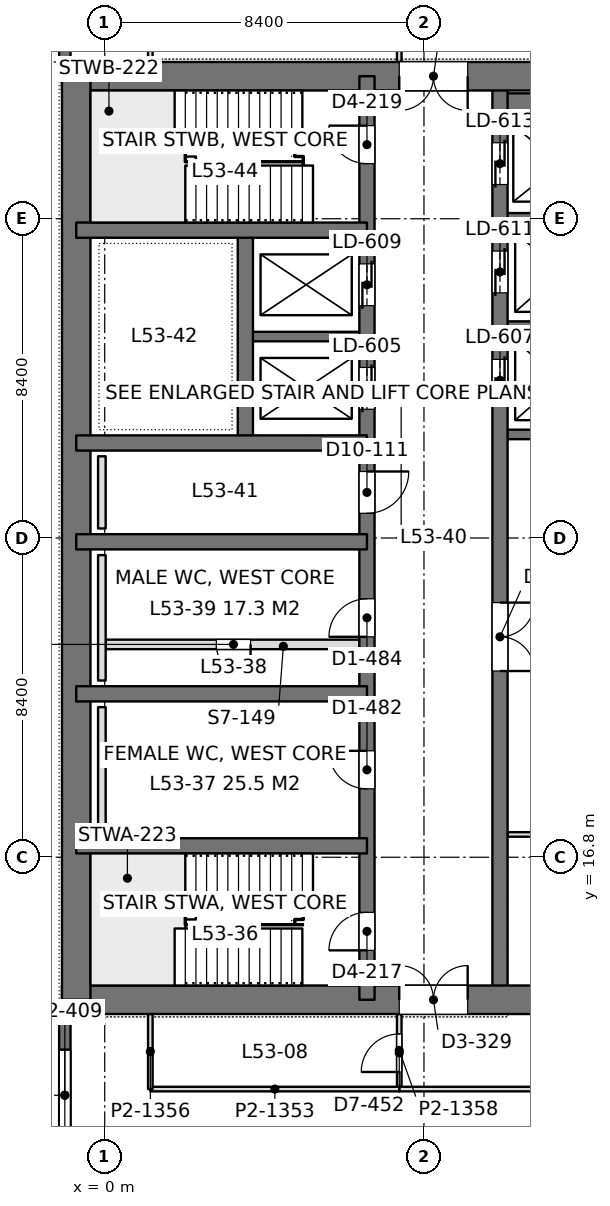
"""IFC4 building model, lengths in metres.
Left out: names, types, materials, properties, quantities, classifications, styles, units other than length and angle.
Written with IfcOpenShell. Run it as: python <this file> out.ifc"""

import sys

from ifc_helpers import new_model, si_unit, direction, frame, frame_2d, origin, place, context, subcontext, project, spatial, rectangle, extrude, element, fill, save


model = new_model("IFC4")
c1 = context("Model", 3, precision=1e-05, world=origin(), true_north=direction((0.0, 1.0)))
c2 = subcontext(c1, "Body", "Model", "MODEL_VIEW")
j1 = project(units=[si_unit("LENGTHUNIT", "METRE"), si_unit("PLANEANGLEUNIT", "RADIAN")], contexts=[c1])
p1 = place(None, origin())
s1 = spatial("IfcSite", under=j1, at=p1, CompositionType="ELEMENT")
p2 = place(p1, origin())
s2 = spatial("IfcBuilding", under=s1, at=p2, CompositionType="ELEMENT")
p3 = place(p2, frame((0.0, 0.0, 232.2)))
s3 = spatial("IfcBuildingStorey", under=s2, at=p3, CompositionType="ELEMENT", Elevation=232.2)
p4 = place(p3, frame((-1.125, 13.05, 0.0), z_axis=(0.0, 0.0, 1.0), x_axis=(1.0, 0.0, 0.0)))
e1 = element("IfcWall", 1, at=p4, inside=s3, PredefinedType="SHEAR", context=c2, shape_type="SweptSolid", body=[
    extrude(rectangle(XDim=17.85, YDim=0.75, at=frame_2d((8.925, 0.0))), origin(), (0.0, 0.0, 1.0), 4.2),
])
p5 = place(p4, frame((8.875, 0.0, 0.0)))
e2 = element("IfcOpeningElement", 2, at=p5, cuts=e1, PredefinedType="OPENING", context=c2, shape_type="SweptSolid", body=[
    extrude(rectangle(XDim=1.8, YDim=2.4, at=frame_2d((0.9, 1.2))), frame((0.0, 0.385, 0.0), z_axis=(0.0, -1.0, 0.0), x_axis=(1.0, 0.0, 0.0)), (0.0, 0.0, 1.0), 0.77),
])
p6 = place(p3, frame((-1.125, 37.35, 0.0), z_axis=(0.0, 0.0, 1.0), x_axis=(1.0, 0.0, 0.0)))
e3 = element("IfcWall", 3, at=p6, inside=s3, PredefinedType="SHEAR", context=c2, shape_type="SweptSolid", body=[
    extrude(rectangle(XDim=17.85, YDim=0.75, at=frame_2d((8.925, 0.0))), origin(), (0.0, 0.0, 1.0), 4.2),
])
p7 = place(p6, frame((8.875, 0.0, 0.0)))
e4 = element("IfcOpeningElement", 4, at=p7, cuts=e3, PredefinedType="OPENING", context=c2, shape_type="SweptSolid", body=[
    extrude(rectangle(XDim=1.8, YDim=2.4, at=frame_2d((0.9, 1.2))), frame((0.0, 0.385, 0.0), z_axis=(0.0, -1.0, 0.0), x_axis=(1.0, 0.0, 0.0)), (0.0, 0.0, 1.0), 0.77),
])
p8 = place(p3, frame((-0.75, 13.05, 0.0), z_axis=(0.0, 0.0, 1.0), x_axis=(0.0, 1.0, 0.0)))
e5 = element("IfcWall", 5, at=p8, inside=s3, PredefinedType="SHEAR", context=c2, shape_type="SweptSolid", body=[
    extrude(rectangle(XDim=24.3, YDim=0.75, at=frame_2d((12.15, 0.0))), origin(), (0.0, 0.0, 1.0), 4.2),
])
p9 = place(p3, frame((6.9, 13.05, 0.0), z_axis=(0.0, 0.0, 1.0), x_axis=(0.0, 1.0, 0.0)))
e6 = element("IfcWall", 6, at=p9, inside=s3, PredefinedType="SHEAR", context=c2, shape_type="SweptSolid", body=[
    extrude(rectangle(XDim=24.3, YDim=0.4, at=frame_2d((12.15, 0.0))), origin(), (0.0, 0.0, 1.0), 4.2),
])
p10 = place(p9, frame((1.3, 0.0, 0.0)))
e7 = element("IfcOpeningElement", 7, at=p10, cuts=e6, PredefinedType="OPENING", context=c2, shape_type="SweptSolid", body=[
    extrude(rectangle(XDim=1.0, YDim=2.2, at=frame_2d((0.5, 1.1))), frame((0.0, 0.21, 0.0), z_axis=(0.0, -1.0, 0.0), x_axis=(1.0, 0.0, 0.0)), (0.0, 0.0, 1.0), 0.42),
])
p11 = place(p9, frame((22.0, 0.0, 0.0)))
e8 = element("IfcOpeningElement", 8, at=p11, cuts=e6, PredefinedType="OPENING", context=c2, shape_type="SweptSolid", body=[
    extrude(rectangle(XDim=1.0, YDim=2.2, at=frame_2d((0.5, 1.1))), frame((0.0, 0.21, 0.0), z_axis=(0.0, -1.0, 0.0), x_axis=(1.0, 0.0, 0.0)), (0.0, 0.0, 1.0), 0.42),
])
p12 = place(p9, frame((5.55, 0.0, 0.0)))
e9 = element("IfcOpeningElement", 9, at=p12, cuts=e6, PredefinedType="OPENING", context=c2, shape_type="SweptSolid", body=[
    extrude(rectangle(XDim=1.0, YDim=2.2, at=frame_2d((0.5, 1.1))), frame((0.0, 0.21, 0.0), z_axis=(0.0, -1.0, 0.0), x_axis=(1.0, 0.0, 0.0)), (0.0, 0.0, 1.0), 0.42),
])
p13 = place(p9, frame((9.55, 0.0, 0.0)))
e10 = element("IfcOpeningElement", 10, at=p13, cuts=e6, PredefinedType="OPENING", context=c2, shape_type="SweptSolid", body=[
    extrude(rectangle(XDim=1.0, YDim=2.2, at=frame_2d((0.5, 1.1))), frame((0.0, 0.21, 0.0), z_axis=(0.0, -1.0, 0.0), x_axis=(1.0, 0.0, 0.0)), (0.0, 0.0, 1.0), 0.42),
])
p14 = place(p9, frame((12.8, 0.0, 0.0)))
e11 = element("IfcOpeningElement", 11, at=p14, cuts=e6, PredefinedType="OPENING", context=c2, shape_type="SweptSolid", body=[
    extrude(rectangle(XDim=1.1, YDim=2.2, at=frame_2d((0.55, 1.1))), frame((0.0, 0.21, 0.0), z_axis=(0.0, -1.0, 0.0), x_axis=(1.0, 0.0, 0.0)), (0.0, 0.0, 1.0), 0.42),
])
p15 = place(p9, frame((15.538, 0.0, 0.0)))
e12 = element("IfcOpeningElement", 12, at=p15, cuts=e6, PredefinedType="OPENING", context=c2, shape_type="SweptSolid", body=[
    extrude(rectangle(XDim=1.1, YDim=2.2, at=frame_2d((0.55, 1.1))), frame((0.0, 0.21, 0.0), z_axis=(0.0, -1.0, 0.0), x_axis=(1.0, 0.0, 0.0)), (0.0, 0.0, 1.0), 0.42),
])
p16 = place(p9, frame((18.262, 0.0, 0.0)))
e13 = element("IfcOpeningElement", 13, at=p16, cuts=e6, PredefinedType="OPENING", context=c2, shape_type="SweptSolid", body=[
    extrude(rectangle(XDim=1.1, YDim=2.2, at=frame_2d((0.55, 1.1))), frame((0.0, 0.21, 0.0), z_axis=(0.0, -1.0, 0.0), x_axis=(1.0, 0.0, 0.0)), (0.0, 0.0, 1.0), 0.42),
])
p17 = place(p3, frame((10.4, 13.05, 0.0), z_axis=(0.0, 0.0, 1.0), x_axis=(0.0, 1.0, 0.0)))
e14 = element("IfcWall", 14, at=p17, inside=s3, PredefinedType="SHEAR", context=c2, shape_type="SweptSolid", body=[
    extrude(rectangle(XDim=24.3, YDim=0.4, at=frame_2d((12.15, 0.0))), origin(), (0.0, 0.0, 1.0), 4.2),
])
p18 = place(p17, frame((15.75, 0.0, 0.0)))
e15 = element("IfcOpeningElement", 15, at=p18, cuts=e14, PredefinedType="OPENING", context=c2, shape_type="SweptSolid", body=[
    extrude(rectangle(XDim=1.1, YDim=2.2, at=frame_2d((0.55, 1.1))), frame((0.0, 0.21, 0.0), z_axis=(0.0, -1.0, 0.0), x_axis=(1.0, 0.0, 0.0)), (0.0, 0.0, 1.0), 0.42),
])
p19 = place(p17, frame((18.6, 0.0, 0.0)))
e16 = element("IfcOpeningElement", 16, at=p19, cuts=e14, PredefinedType="OPENING", context=c2, shape_type="SweptSolid", body=[
    extrude(rectangle(XDim=1.1, YDim=2.2, at=frame_2d((0.55, 1.1))), frame((0.0, 0.21, 0.0), z_axis=(0.0, -1.0, 0.0), x_axis=(1.0, 0.0, 0.0)), (0.0, 0.0, 1.0), 0.42),
])
p20 = place(p17, frame((21.45, 0.0, 0.0)))
e17 = element("IfcOpeningElement", 17, at=p20, cuts=e14, PredefinedType="OPENING", context=c2, shape_type="SweptSolid", body=[
    extrude(rectangle(XDim=1.1, YDim=2.2, at=frame_2d((0.55, 1.1))), frame((0.0, 0.21, 0.0), z_axis=(0.0, -1.0, 0.0), x_axis=(1.0, 0.0, 0.0)), (0.0, 0.0, 1.0), 0.42),
])
p21 = place(p17, frame((8.65, 0.0, 0.0)))
e18 = element("IfcOpeningElement", 18, at=p21, cuts=e14, PredefinedType="OPENING", context=c2, shape_type="SweptSolid", body=[
    extrude(rectangle(XDim=1.8, YDim=2.4, at=frame_2d((0.9, 1.2))), frame((0.0, 0.21, 0.0), z_axis=(0.0, -1.0, 0.0), x_axis=(1.0, 0.0, 0.0)), (0.0, 0.0, 1.0), 0.42),
])
for number, where, z_axis, x_axis in (
    (19, (-0.75, 17.1, 0.0), (0.0, 0.0, 1.0), (1.0, 0.0, 0.0)),
    (20, (-0.75, 21.1, 0.0), (0.0, 0.0, 1.0), (1.0, 0.0, 0.0)),
    (21, (-0.75, 25.1, 0.0), (0.0, 0.0, 1.0), (1.0, 0.0, 0.0)),
    (22, (-0.75, 27.7, 0.0), (0.0, 0.0, 1.0), (1.0, 0.0, 0.0)),
    (23, (-0.75, 33.3, 0.0), (0.0, 0.0, 1.0), (1.0, 0.0, 0.0)),
):
    element("IfcWall", number, at=place(p3, frame(where, z_axis=z_axis, x_axis=x_axis)), inside=s3, PredefinedType="SHEAR", context=c2, shape_type="SweptSolid", body=[
        extrude(rectangle(XDim=7.65, YDim=0.4, at=frame_2d((3.825, 0.0))), origin(), (0.0, 0.0, 1.0), 4.2),
    ])
p22 = place(p3, frame((3.7, 27.7, 0.0), z_axis=(0.0, 0.0, 1.0), x_axis=(0.0, 1.0, 0.0)))
e24 = element("IfcWall", 24, at=p22, inside=s3, PredefinedType="SHEAR", context=c2, shape_type="SweptSolid", body=[
    extrude(rectangle(XDim=5.6, YDim=0.4, at=frame_2d((2.8, 0.0))), origin(), (0.0, 0.0, 1.0), 4.2),
])
p23 = place(p3, frame((3.7, 30.5, 0.0), z_axis=(0.0, 0.0, 1.0), x_axis=(1.0, 0.0, 0.0)))
e25 = element("IfcWall", 25, at=p23, inside=s3, PredefinedType="SHEAR", context=c2, shape_type="SweptSolid", body=[
    extrude(rectangle(XDim=3.2, YDim=0.25, at=frame_2d((1.6, 0.0))), origin(), (0.0, 0.0, 1.0), 4.2),
])
p24 = place(p3, frame((10.4, 27.925, 0.0), z_axis=(0.0, 0.0, 1.0), x_axis=(1.0, 0.0, 0.0)))
e26 = element("IfcWall", 26, at=p24, inside=s3, PredefinedType="SHEAR", context=c2, shape_type="SweptSolid", body=[
    extrude(rectangle(XDim=5.95, YDim=0.25, at=frame_2d((2.975, 0.0))), origin(), (0.0, 0.0, 1.0), 4.2),
])
for number, where, z_axis, x_axis in (
    (27, (10.4, 30.775, 0.0), (0.0, 0.0, 1.0), (1.0, 0.0, 0.0)),
    (28, (10.4, 33.625, 0.0), (0.0, 0.0, 1.0), (1.0, 0.0, 0.0)),
):
    element("IfcWall", number, at=place(p3, frame(where, z_axis=z_axis, x_axis=x_axis)), inside=s3, PredefinedType="SHEAR", context=c2, shape_type="SweptSolid", body=[
        extrude(rectangle(XDim=3.2, YDim=0.25, at=frame_2d((1.6, 0.0))), origin(), (0.0, 0.0, 1.0), 4.2),
    ])
p25 = place(p3, frame((10.4, 36.625, 0.0), z_axis=(0.0, 0.0, 1.0), x_axis=(1.0, 0.0, 0.0)))
e29 = element("IfcWall", 29, at=p25, inside=s3, PredefinedType="SHEAR", context=c2, shape_type="SweptSolid", body=[
    extrude(rectangle(XDim=3.2, YDim=0.55, at=frame_2d((1.6, 0.0))), origin(), (0.0, 0.0, 1.0), 4.2),
])
p26 = place(p3, frame((-1.05, 8.4, 0.0), z_axis=(0.0, 0.0, 1.0), x_axis=(0.0, 1.0, 0.0)))
e30 = element("IfcWall", 30, at=p26, inside=s3, PredefinedType="SOLIDWALL", context=c2, shape_type="SweptSolid", body=[
    extrude(rectangle(XDim=4.275, YDim=0.3, at=frame_2d((2.138, 0.0))), origin(), (0.0, 0.0, 1.0), 4.05),
])
p27 = place(p26, frame((0.938, 0.0, 0.9)))
e31 = element("IfcOpeningElement", 31, at=p27, cuts=e30, PredefinedType="OPENING", context=c2, shape_type="SweptSolid", body=[
    extrude(rectangle(XDim=2.4, YDim=1.9, at=frame_2d((1.2, 0.95))), frame((0.0, 0.16, 0.0), z_axis=(0.0, -1.0, 0.0), x_axis=(1.0, 0.0, 0.0)), (0.0, 0.0, 1.0), 0.32),
])
p28 = place(p3, frame((-1.05, 37.725, 0.0), z_axis=(0.0, 0.0, 1.0), x_axis=(0.0, 1.0, 0.0)))
e32 = element("IfcWall", 32, at=p28, inside=s3, PredefinedType="SOLIDWALL", context=c2, shape_type="SweptSolid", body=[
    extrude(rectangle(XDim=4.275, YDim=0.3, at=frame_2d((2.137, 0.0))), origin(), (0.0, 0.0, 1.0), 4.05),
])
p29 = place(p28, frame((0.938, 0.0, 0.9)))
e33 = element("IfcOpeningElement", 33, at=p29, cuts=e32, PredefinedType="OPENING", context=c2, shape_type="SweptSolid", body=[
    extrude(rectangle(XDim=2.4, YDim=1.9, at=frame_2d((1.2, 0.95))), frame((0.0, 0.16, 0.0), z_axis=(0.0, -1.0, 0.0), x_axis=(1.0, 0.0, 0.0)), (0.0, 0.0, 1.0), 0.32),
])
p30 = place(p3, frame((10.598, 17.4, 0.0), z_axis=(0.0, 0.0, 1.0), x_axis=(1.0, 0.0, 0.0)))
e34 = element("IfcWall", 34, at=p30, inside=s3, PredefinedType="PARTITIONING", context=c2, shape_type="SweptSolid", body=[
    extrude(rectangle(XDim=5.904, YDim=0.12, at=frame_2d((2.952, 0.0))), origin(), (0.0, 0.0, 1.0), 3.55),
])
p31 = place(p3, frame((7.748, 10.7, 0.0), z_axis=(0.0, 0.0, 1.0), x_axis=(1.0, 0.0, 0.0)))
e35 = element("IfcWall", 35, at=p31, inside=s3, PredefinedType="PARTITIONING", context=c2, shape_type="SweptSolid", body=[
    extrude(rectangle(XDim=34.904, YDim=0.12, at=frame_2d((17.452, 0.0))), origin(), (0.0, 0.0, 1.0), 3.55),
])
p32 = place(p31, frame((10.735, 0.0, 0.0)))
e36 = element("IfcOpeningElement", 36, at=p32, cuts=e35, PredefinedType="OPENING", context=c2, shape_type="SweptSolid", body=[
    extrude(rectangle(XDim=1.8, YDim=2.2, at=frame_2d((0.9, 1.1))), frame((0.0, 0.07, 0.0), z_axis=(0.0, -1.0, 0.0), x_axis=(1.0, 0.0, 0.0)), (0.0, 0.0, 1.0), 0.14),
])
p33 = place(p31, frame((22.369, 0.0, 0.0)))
e37 = element("IfcOpeningElement", 37, at=p33, cuts=e35, PredefinedType="OPENING", context=c2, shape_type="SweptSolid", body=[
    extrude(rectangle(XDim=1.8, YDim=2.2, at=frame_2d((0.9, 1.1))), frame((0.0, 0.07, 0.0), z_axis=(0.0, -1.0, 0.0), x_axis=(1.0, 0.0, 0.0)), (0.0, 0.0, 1.0), 0.14),
])
p34 = place(p3, frame((7.75, 10.758, 0.0), z_axis=(0.0, 0.0, 1.0), x_axis=(0.0, 1.0, 0.0)))
e38 = element("IfcWall", 38, at=p34, inside=s3, PredefinedType="PARTITIONING", context=c2, shape_type="SweptSolid", body=[
    extrude(rectangle(XDim=1.918, YDim=0.12, at=frame_2d((0.959, 0.0))), origin(), (0.0, 0.0, 1.0), 4.05),
])
p35 = place(p34, frame((0.392, 0.0, 0.0)))
e39 = element("IfcOpeningElement", 39, at=p35, cuts=e38, PredefinedType="OPENING", context=c2, shape_type="SweptSolid", body=[
    extrude(rectangle(XDim=1.0, YDim=2.4, at=frame_2d((0.5, 1.2))), frame((0.0, 0.07, 0.0), z_axis=(0.0, -1.0, 0.0), x_axis=(1.0, 0.0, 0.0)), (0.0, 0.0, 1.0), 0.14),
])
p36 = place(p3, frame((1.2, 10.7, 0.0), z_axis=(0.0, 0.0, 1.0), x_axis=(1.0, 0.0, 0.0)))
e40 = element("IfcWall", 40, at=p36, inside=s3, PredefinedType="PARTITIONING", context=c2, shape_type="SweptSolid", body=[
    extrude(rectangle(XDim=6.552, YDim=0.12, at=frame_2d((3.276, 0.0))), origin(), (0.0, 0.0, 1.0), 4.05),
])
p37 = place(p3, frame((1.2, 10.7, 0.0), z_axis=(0.0, 0.0, 1.0), x_axis=(0.0, 1.0, 0.0)))
e41 = element("IfcWall", 41, at=p37, inside=s3, PredefinedType="PARTITIONING", context=c2, shape_type="SweptSolid", body=[
    extrude(rectangle(XDim=1.976, YDim=0.12, at=frame_2d((0.988, 0.0))), origin(), (0.0, 0.0, 1.0), 4.05),
])
p38 = place(p3, frame((7.75, 37.724, 0.0), z_axis=(0.0, 0.0, 1.0), x_axis=(0.0, 1.0, 0.0)))
e42 = element("IfcWall", 42, at=p38, inside=s3, PredefinedType="PARTITIONING", context=c2, shape_type="SweptSolid", body=[
    extrude(rectangle(XDim=1.918, YDim=0.12, at=frame_2d((0.959, 0.0))), origin(), (0.0, 0.0, 1.0), 4.05),
])
p39 = place(p38, frame((0.526, 0.0, 0.0)))
e43 = element("IfcOpeningElement", 43, at=p39, cuts=e42, PredefinedType="OPENING", context=c2, shape_type="SweptSolid", body=[
    extrude(rectangle(XDim=1.0, YDim=2.4, at=frame_2d((0.5, 1.2))), frame((0.0, 0.07, 0.0), z_axis=(0.0, -1.0, 0.0), x_axis=(1.0, 0.0, 0.0)), (0.0, 0.0, 1.0), 0.14),
])
p40 = place(p3, frame((1.2, 37.724, 0.0), z_axis=(0.0, 0.0, 1.0), x_axis=(0.0, 1.0, 0.0)))
e44 = element("IfcWall", 44, at=p40, inside=s3, PredefinedType="PARTITIONING", context=c2, shape_type="SweptSolid", body=[
    extrude(rectangle(XDim=1.976, YDim=0.12, at=frame_2d((0.988, 0.0))), origin(), (0.0, 0.0, 1.0), 4.05),
])
p41 = place(p3, frame((0.025, 22.4, 0.0), z_axis=(0.0, 0.0, 1.0), x_axis=(1.0, 0.0, 0.0)))
e45 = element("IfcWall", 45, at=p41, inside=s3, PredefinedType="PARTITIONING", context=c2, shape_type="SweptSolid", body=[
    extrude(rectangle(XDim=6.675, YDim=0.25, at=frame_2d((3.337, 0.0))), origin(), (0.0, 0.0, 1.0), 4.0),
])
p42 = place(p41, frame((2.913, 0.0, 0.0)))
e46 = element("IfcOpeningElement", 46, at=p42, cuts=e45, PredefinedType="OPENING", context=c2, shape_type="SweptSolid", body=[
    extrude(rectangle(XDim=0.9, YDim=2.2, at=frame_2d((0.45, 1.1))), frame((0.0, 0.135, 0.0), z_axis=(0.0, -1.0, 0.0), x_axis=(1.0, 0.0, 0.0)), (0.0, 0.0, 1.0), 0.27),
])
for number, where, z_axis, x_axis in (
    (47, (-0.075, 17.45, 0.0), (0.0, 0.0, 1.0), (0.0, 1.0, 0.0)),
    (48, (-0.075, 21.45, 0.0), (0.0, 0.0, 1.0), (0.0, 1.0, 0.0)),
):
    element("IfcWall", number, at=place(p3, frame(where, z_axis=z_axis, x_axis=x_axis)), inside=s3, PredefinedType="PLUMBINGWALL", context=c2, shape_type="SweptSolid", body=[
        extrude(rectangle(XDim=3.3, YDim=0.2, at=frame_2d((1.65, 0.0))), origin(), (0.0, 0.0, 1.0), 1.2),
    ])
p43 = place(p3, frame((-0.075, 25.45, 0.0), z_axis=(0.0, 0.0, 1.0), x_axis=(0.0, 1.0, 0.0)))
e49 = element("IfcWall", 49, at=p43, inside=s3, PredefinedType="PLUMBINGWALL", context=c2, shape_type="SweptSolid", body=[
    extrude(rectangle(XDim=1.9, YDim=0.2, at=frame_2d((0.95, 0.0))), origin(), (0.0, 0.0, 1.0), 1.2),
])
p44 = place(p27, origin())
e50 = element("IfcWindow", 50, at=p44, inside=s3, PartitioningType="SINGLE_PANEL", PredefinedType="WINDOW", context=c2, shape_type="SweptSolid", body=[
    extrude(rectangle(XDim=2.4, YDim=1.9, at=frame_2d((1.2, 0.95))), frame((0.0, 0.03, 0.0), z_axis=(0.0, -1.0, 0.0), x_axis=(1.0, 0.0, 0.0)), (0.0, 0.0, 1.0), 0.06),
])
fill(e31, e50)
p45 = place(p5, origin())
e51 = element("IfcDoor", 51, at=p45, inside=s3, OperationType="DOUBLE_DOOR_SINGLE_SWING", PredefinedType="DOOR", context=c2, shape_type="SweptSolid", body=[
    extrude(rectangle(XDim=1.8, YDim=2.4, at=frame_2d((0.9, 1.2))), frame((0.0, 0.025, 0.0), z_axis=(0.0, -1.0, 0.0), x_axis=(1.0, 0.0, 0.0)), (0.0, 0.0, 1.0), 0.05),
])
fill(e2, e51)
p46 = place(p7, frame((1.8, 0.0, 0.0), z_axis=(0.0, 0.0, 1.0), x_axis=(-1.0, 0.0, 0.0)))
e52 = element("IfcDoor", 52, at=p46, inside=s3, OperationType="DOUBLE_DOOR_SINGLE_SWING", PredefinedType="DOOR", context=c2, shape_type="SweptSolid", body=[
    extrude(rectangle(XDim=1.8, YDim=2.4, at=frame_2d((0.9, 1.2))), frame((0.0, 0.025, 0.0), z_axis=(0.0, -1.0, 0.0), x_axis=(1.0, 0.0, 0.0)), (0.0, 0.0, 1.0), 0.05),
])
fill(e4, e52)
p47 = place(p10, origin())
e53 = element("IfcDoor", 53, at=p47, inside=s3, OperationType="SINGLE_SWING_LEFT", PredefinedType="DOOR", context=c2, shape_type="SweptSolid", body=[
    extrude(rectangle(XDim=1.0, YDim=2.2, at=frame_2d((0.5, 1.1))), frame((0.0, 0.025, 0.0), z_axis=(0.0, -1.0, 0.0), x_axis=(1.0, 0.0, 0.0)), (0.0, 0.0, 1.0), 0.05),
])
fill(e7, e53)
p48 = place(p11, origin())
e54 = element("IfcDoor", 54, at=p48, inside=s3, OperationType="SINGLE_SWING_RIGHT", PredefinedType="DOOR", context=c2, shape_type="SweptSolid", body=[
    extrude(rectangle(XDim=1.0, YDim=2.2, at=frame_2d((0.5, 1.1))), frame((0.0, 0.025, 0.0), z_axis=(0.0, -1.0, 0.0), x_axis=(1.0, 0.0, 0.0)), (0.0, 0.0, 1.0), 0.05),
])
fill(e8, e54)
p49 = place(p12, origin())
e55 = element("IfcDoor", 55, at=p49, inside=s3, OperationType="SINGLE_SWING_RIGHT", PredefinedType="DOOR", context=c2, shape_type="SweptSolid", body=[
    extrude(rectangle(XDim=1.0, YDim=2.2, at=frame_2d((0.5, 1.1))), frame((0.0, 0.025, 0.0), z_axis=(0.0, -1.0, 0.0), x_axis=(1.0, 0.0, 0.0)), (0.0, 0.0, 1.0), 0.05),
])
fill(e9, e55)
p50 = place(p13, origin())
e56 = element("IfcDoor", 56, at=p50, inside=s3, OperationType="SINGLE_SWING_LEFT", PredefinedType="DOOR", context=c2, shape_type="SweptSolid", body=[
    extrude(rectangle(XDim=1.0, YDim=2.2, at=frame_2d((0.5, 1.1))), frame((0.0, 0.025, 0.0), z_axis=(0.0, -1.0, 0.0), x_axis=(1.0, 0.0, 0.0)), (0.0, 0.0, 1.0), 0.05),
])
fill(e10, e56)
p51 = place(p14, frame((1.1, 0.0, 0.0), z_axis=(0.0, 0.0, 1.0), x_axis=(-1.0, 0.0, 0.0)))
e57 = element("IfcDoor", 57, at=p51, inside=s3, OperationType="SINGLE_SWING_LEFT", PredefinedType="DOOR", context=c2, shape_type="SweptSolid", body=[
    extrude(rectangle(XDim=1.1, YDim=2.2, at=frame_2d((0.55, 1.1))), frame((0.0, 0.025, 0.0), z_axis=(0.0, -1.0, 0.0), x_axis=(1.0, 0.0, 0.0)), (0.0, 0.0, 1.0), 0.05),
])
fill(e11, e57)
p52 = place(p18, origin())
e58 = element("IfcDoor", 58, at=p52, inside=s3, OperationType="DOUBLE_DOOR_SLIDING", PredefinedType="DOOR", context=c2, shape_type="SweptSolid", body=[
    extrude(rectangle(XDim=1.1, YDim=2.2, at=frame_2d((0.55, 1.1))), frame((0.0, 0.025, 0.0), z_axis=(0.0, -1.0, 0.0), x_axis=(1.0, 0.0, 0.0)), (0.0, 0.0, 1.0), 0.05),
])
fill(e15, e58)
p53 = place(p19, origin())
e59 = element("IfcDoor", 59, at=p53, inside=s3, OperationType="DOUBLE_DOOR_SLIDING", PredefinedType="DOOR", context=c2, shape_type="SweptSolid", body=[
    extrude(rectangle(XDim=1.1, YDim=2.2, at=frame_2d((0.55, 1.1))), frame((0.0, 0.025, 0.0), z_axis=(0.0, -1.0, 0.0), x_axis=(1.0, 0.0, 0.0)), (0.0, 0.0, 1.0), 0.05),
])
fill(e16, e59)
p54 = place(p20, origin())
e60 = element("IfcDoor", 60, at=p54, inside=s3, OperationType="DOUBLE_DOOR_SLIDING", PredefinedType="DOOR", context=c2, shape_type="SweptSolid", body=[
    extrude(rectangle(XDim=1.1, YDim=2.2, at=frame_2d((0.55, 1.1))), frame((0.0, 0.025, 0.0), z_axis=(0.0, -1.0, 0.0), x_axis=(1.0, 0.0, 0.0)), (0.0, 0.0, 1.0), 0.05),
])
fill(e17, e60)
p55 = place(p15, origin())
e61 = element("IfcDoor", 61, at=p55, inside=s3, OperationType="DOUBLE_DOOR_SLIDING", PredefinedType="DOOR", context=c2, shape_type="SweptSolid", body=[
    extrude(rectangle(XDim=1.1, YDim=2.2, at=frame_2d((0.55, 1.1))), frame((0.0, 0.025, 0.0), z_axis=(0.0, -1.0, 0.0), x_axis=(1.0, 0.0, 0.0)), (0.0, 0.0, 1.0), 0.05),
])
fill(e12, e61)
p56 = place(p16, origin())
e62 = element("IfcDoor", 62, at=p56, inside=s3, OperationType="DOUBLE_DOOR_SLIDING", PredefinedType="DOOR", context=c2, shape_type="SweptSolid", body=[
    extrude(rectangle(XDim=1.1, YDim=2.2, at=frame_2d((0.55, 1.1))), frame((0.0, 0.025, 0.0), z_axis=(0.0, -1.0, 0.0), x_axis=(1.0, 0.0, 0.0)), (0.0, 0.0, 1.0), 0.05),
])
fill(e13, e62)
p57 = place(p21, frame((1.8, 0.0, 0.0), z_axis=(0.0, 0.0, 1.0), x_axis=(-1.0, 0.0, 0.0)))
e63 = element("IfcDoor", 63, at=p57, inside=s3, OperationType="DOUBLE_DOOR_SINGLE_SWING", PredefinedType="DOOR", context=c2, shape_type="SweptSolid", body=[
    extrude(rectangle(XDim=1.8, YDim=2.4, at=frame_2d((0.9, 1.2))), frame((0.0, 0.025, 0.0), z_axis=(0.0, -1.0, 0.0), x_axis=(1.0, 0.0, 0.0)), (0.0, 0.0, 1.0), 0.05),
])
fill(e18, e63)
p58 = place(p35, origin())
e64 = element("IfcDoor", 64, at=p58, inside=s3, OperationType="SINGLE_SWING_LEFT", PredefinedType="DOOR", context=c2, shape_type="SweptSolid", body=[
    extrude(rectangle(XDim=1.0, YDim=2.4, at=frame_2d((0.5, 1.2))), frame((0.0, 0.025, 0.0), z_axis=(0.0, -1.0, 0.0), x_axis=(1.0, 0.0, 0.0)), (0.0, 0.0, 1.0), 0.05),
])
fill(e39, e64)
p59 = place(p42, frame((0.9, 0.0, 0.0), z_axis=(0.0, 0.0, 1.0), x_axis=(-1.0, 0.0, 0.0)))
e65 = element("IfcDoor", 65, at=p59, inside=s3, OperationType="SINGLE_SWING_LEFT", PredefinedType="DOOR", context=c2, shape_type="SweptSolid", body=[
    extrude(rectangle(XDim=0.9, YDim=2.2, at=frame_2d((0.45, 1.1))), frame((0.0, 0.025, 0.0), z_axis=(0.0, -1.0, 0.0), x_axis=(1.0, 0.0, 0.0)), (0.0, 0.0, 1.0), 0.05),
])
fill(e46, e65)
save(model, sys.argv[1])
